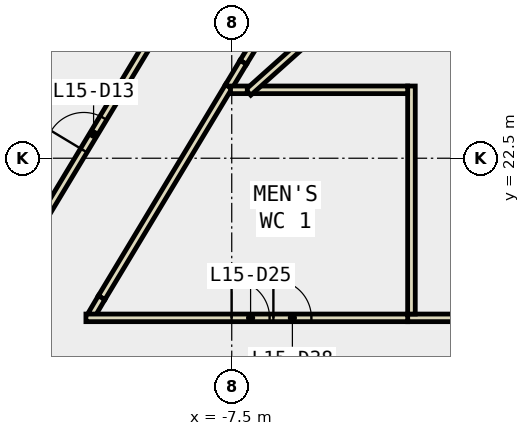
"""IFC4 building model, lengths in metres.
Left out: names, types, materials, properties, quantities, classifications, styles, units other than length and angle.
Written with IfcOpenShell. Run it as: python <this file> out.ifc"""

import sys

from ifc_helpers import new_model, si_unit, direction, frame, frame_2d, origin, place, context, subcontext, project, spatial, rectangle, extrude, element, fill, save


model = new_model("IFC4")
c1 = context("Model", 3, precision=1e-05, world=origin(), true_north=direction((0.0, 1.0)))
c2 = subcontext(c1, "Body", "Model", "MODEL_VIEW")
j1 = project(units=[si_unit("LENGTHUNIT", "METRE"), si_unit("PLANEANGLEUNIT", "RADIAN")], contexts=[c1])
p1 = place(None, origin())
s1 = spatial("IfcSite", under=j1, at=p1, CompositionType="ELEMENT")
p2 = place(p1, origin())
s2 = spatial("IfcBuilding", under=s1, at=p2, CompositionType="ELEMENT")
p3 = place(p2, frame((0.0, 0.0, 72.8)))
s3 = spatial("IfcBuildingStorey", under=s2, at=p3, CompositionType="ELEMENT", Elevation=72.8)
p4 = place(p3, frame((-7.58, 24.386, 0.0), z_axis=(0.0, 0.0, 1.0), x_axis=(-0.51574664882, -0.85674114774, 0.0)))
e1 = element("IfcWall", 1, at=p4, inside=s3, PredefinedType="PARTITIONING", context=c2, shape_type="SweptSolid", body=[
    extrude(rectangle(XDim=6.484, YDim=0.2, at=frame_2d((3.242, 0.0))), origin(), (0.0, 0.0, 1.0), 3.8),
])
p5 = place(p3, frame((-10.924, 18.831, 0.0), z_axis=(0.0, 0.0, 1.0), x_axis=(-0.507247363226, -0.861800506208, 0.0)))
e2 = element("IfcWall", 2, at=p5, inside=s3, PredefinedType="PARTITIONING", context=c2, shape_type="SweptSolid", body=[
    extrude(rectangle(XDim=0.516, YDim=0.2, at=frame_2d((0.258, 0.0))), origin(), (0.0, 0.0, 1.0), 3.8),
])
p6 = place(p3, frame((-3.411, 31.185, 0.0), z_axis=(0.0, 0.0, 1.0), x_axis=(-0.523464329994, -0.852047589765, 0.0)))
e3 = element("IfcWall", 3, at=p6, inside=s3, PredefinedType="PARTITIONING", context=c2, shape_type="SweptSolid", body=[
    extrude(rectangle(XDim=7.231, YDim=0.2, at=frame_2d((3.615, 0.0))), origin(), (0.0, 0.0, 1.0), 3.8),
])
p7 = place(p6, frame((3.115, 0.0, 0.0)))
e4 = element("IfcOpeningElement", 4, at=p7, cuts=e3, PredefinedType="OPENING", context=c2, shape_type="SweptSolid", body=[
    extrude(rectangle(XDim=1.0, YDim=2.1, at=frame_2d((0.5, 1.05))), frame((0.0, 0.11, 0.0), z_axis=(0.0, -1.0, 0.0), x_axis=(1.0, 0.0, 0.0)), (0.0, 0.0, 1.0), 0.22),
])
p8 = place(p3, frame((-7.196, 25.024, 0.0), z_axis=(0.0, 0.0, 1.0), x_axis=(-0.515748848873, -0.856739823334, 0.0)))
e5 = element("IfcWall", 5, at=p8, inside=s3, PredefinedType="PARTITIONING", context=c2, shape_type="SweptSolid", body=[
    extrude(rectangle(XDim=0.745, YDim=0.2, at=frame_2d((0.372, 0.0))), origin(), (0.0, 0.0, 1.0), 3.8),
])
p9 = place(p3, frame((-13.025, 19.995, 0.0), z_axis=(0.0, 0.0, 1.0), x_axis=(0.515828195336, 0.856692052546, 0.0)))
e6 = element("IfcWall", 6, at=p9, inside=s3, PredefinedType="PARTITIONING", context=c2, shape_type="SweptSolid", body=[
    extrude(rectangle(XDim=7.326, YDim=0.2, at=frame_2d((3.663, 0.0))), origin(), (0.0, 0.0, 1.0), 3.8),
])
p10 = place(p9, frame((3.163, 0.0, 0.0)))
e7 = element("IfcOpeningElement", 7, at=p10, cuts=e6, PredefinedType="OPENING", context=c2, shape_type="SweptSolid", body=[
    extrude(rectangle(XDim=1.0, YDim=2.1, at=frame_2d((0.5, 1.05))), frame((0.0, 0.11, 0.0), z_axis=(0.0, -1.0, 0.0), x_axis=(1.0, 0.0, 0.0)), (0.0, 0.0, 1.0), 0.22),
])
p11 = place(p3, frame((-2.871, 18.3, 0.0), z_axis=(0.0, 0.0, 1.0), x_axis=(1.0, 0.0, 0.0)))
e8 = element("IfcWall", 8, at=p11, inside=s3, PredefinedType="PARTITIONING", context=c2, shape_type="SweptSolid", body=[
    extrude(rectangle(XDim=2.471, YDim=0.2, at=frame_2d((1.236, 0.0))), origin(), (0.0, 0.0, 1.0), 3.8),
])
p12 = place(p3, frame((-11.337, 18.3, 0.0), z_axis=(0.0, 0.0, 1.0), x_axis=(1.0, 0.0, 0.0)))
e9 = element("IfcWall", 9, at=p12, inside=s3, PredefinedType="PARTITIONING", context=c2, shape_type="SweptSolid", body=[
    extrude(rectangle(XDim=8.466, YDim=0.2, at=frame_2d((4.233, 0.0))), origin(), (0.0, 0.0, 1.0), 3.8),
])
p13 = place(p12, frame((3.833, 0.0, 0.0)))
e10 = element("IfcOpeningElement", 10, at=p13, cuts=e9, PredefinedType="OPENING", context=c2, shape_type="SweptSolid", body=[
    extrude(rectangle(XDim=1.0, YDim=2.1, at=frame_2d((0.5, 1.05))), frame((0.0, 0.11, 0.0), z_axis=(0.0, -1.0, 0.0), x_axis=(1.0, 0.0, 0.0)), (0.0, 0.0, 1.0), 0.22),
])
p14 = place(p12, frame((4.933, 0.0, 0.0)))
e11 = element("IfcOpeningElement", 11, at=p14, cuts=e9, PredefinedType="OPENING", context=c2, shape_type="SweptSolid", body=[
    extrude(rectangle(XDim=1.0, YDim=2.1, at=frame_2d((0.5, 1.05))), frame((0.0, 0.11, 0.0), z_axis=(0.0, -1.0, 0.0), x_axis=(1.0, 0.0, 0.0)), (0.0, 0.0, 1.0), 0.22),
])
p15 = place(p3, frame((-2.771, 18.4, 0.0), z_axis=(0.0, 0.0, 1.0), x_axis=(0.0, 1.0, 0.0)))
e12 = element("IfcWall", 12, at=p15, inside=s3, PredefinedType="PARTITIONING", context=c2, shape_type="SweptSolid", body=[
    extrude(rectangle(XDim=6.0, YDim=0.2, at=frame_2d((3.0, 0.0))), origin(), (0.0, 0.0, 1.0), 3.8),
])
p16 = place(p3, frame((-2.871, 24.3, 0.0), z_axis=(0.0, 0.0, 1.0), x_axis=(-1.0, 0.0, 0.0)))
e13 = element("IfcWall", 13, at=p16, inside=s3, PredefinedType="PARTITIONING", context=c2, shape_type="SweptSolid", body=[
    extrude(rectangle(XDim=4.02, YDim=0.2, at=frame_2d((2.01, 0.0))), origin(), (0.0, 0.0, 1.0), 3.8),
])
p17 = place(p3, frame((-7.065, 24.233, 0.0), z_axis=(0.0, 0.0, 1.0), x_axis=(0.745362618546, 0.666659258448, 0.0)))
e14 = element("IfcWall", 14, at=p17, inside=s3, PredefinedType="PARTITIONING", context=c2, shape_type="SweptSolid", body=[
    extrude(rectangle(XDim=9.579, YDim=0.2, at=frame_2d((4.79, 0.0))), origin(), (0.0, 0.0, 1.0), 3.8),
])
p18 = place(p3, frame((-7.532, 24.3, 0.0), z_axis=(0.0, 0.0, 1.0), x_axis=(1.0, 0.0, 0.0)))
e15 = element("IfcWall", 15, at=p18, inside=s3, PredefinedType="PARTITIONING", context=c2, shape_type="SweptSolid", body=[
    extrude(rectangle(XDim=0.441, YDim=0.2, at=frame_2d((0.22, 0.0))), origin(), (0.0, 0.0, 1.0), 3.8),
])
p19 = place(p10, origin())
e16 = element("IfcDoor", 16, at=p19, inside=s3, OperationType="SINGLE_SWING_LEFT", PredefinedType="DOOR", context=c2, shape_type="SweptSolid", body=[
    extrude(rectangle(XDim=1.0, YDim=2.1, at=frame_2d((0.5, 1.05))), frame((0.0, 0.025, 0.0), z_axis=(0.0, -1.0, 0.0), x_axis=(1.0, 0.0, 0.0)), (0.0, 0.0, 1.0), 0.05),
])
fill(e7, e16)
p20 = place(p13, origin())
e17 = element("IfcDoor", 17, at=p20, inside=s3, OperationType="SINGLE_SWING_RIGHT", PredefinedType="DOOR", context=c2, shape_type="SweptSolid", body=[
    extrude(rectangle(XDim=1.0, YDim=2.1, at=frame_2d((0.5, 1.05))), frame((0.0, 0.025, 0.0), z_axis=(0.0, -1.0, 0.0), x_axis=(1.0, 0.0, 0.0)), (0.0, 0.0, 1.0), 0.05),
])
fill(e10, e17)
p21 = place(p14, origin())
e18 = element("IfcDoor", 18, at=p21, inside=s3, OperationType="SINGLE_SWING_RIGHT", PredefinedType="DOOR", context=c2, shape_type="SweptSolid", body=[
    extrude(rectangle(XDim=1.0, YDim=2.1, at=frame_2d((0.5, 1.05))), frame((0.0, 0.025, 0.0), z_axis=(0.0, -1.0, 0.0), x_axis=(1.0, 0.0, 0.0)), (0.0, 0.0, 1.0), 0.05),
])
fill(e11, e18)
save(model, sys.argv[1])
